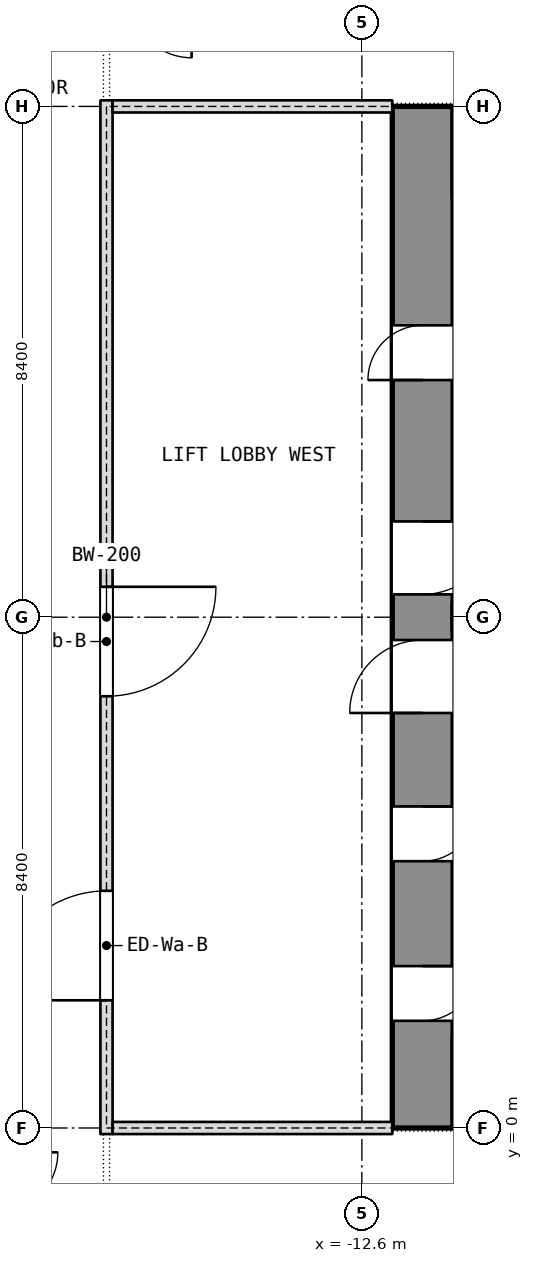
"""IFC4 building model, lengths in metres.
Left out: names, types, materials, properties, quantities, classifications, styles, units other than length and angle.
Written with IfcOpenShell. Run it as: python <this file> out.ifc"""

import sys

from ifc_helpers import new_model, si_unit, direction, frame, frame_2d, origin, place, context, subcontext, project, spatial, rectangle, extrude, element, fill, save


model = new_model("IFC4")
c1 = context("Model", 3, precision=1e-05, world=origin(), true_north=direction((0.0, 1.0)))
c2 = subcontext(c1, "Body", "Model", "MODEL_VIEW")
j1 = project(units=[si_unit("LENGTHUNIT", "METRE"), si_unit("PLANEANGLEUNIT", "RADIAN")], contexts=[c1])
p1 = place(None, origin())
s1 = spatial("IfcSite", under=j1, at=p1, CompositionType="ELEMENT")
p2 = place(p1, origin())
s2 = spatial("IfcBuilding", under=s1, at=p2, CompositionType="ELEMENT")
p3 = place(p2, frame((0.0, 0.0, 158.9)))
s3 = spatial("IfcBuildingStorey", under=s2, at=p3, CompositionType="ELEMENT", Elevation=158.9)
p4 = place(p3, frame((-11.6, 0.0, 0.0), z_axis=(0.0, 0.0, 1.0), x_axis=(0.0, 1.0, 0.0)))
e1 = element("IfcWall", 1, at=p4, inside=s3, PredefinedType="SHEAR", context=c2, shape_type="SweptSolid", body=[
    extrude(rectangle(XDim=16.8, YDim=1.0, at=frame_2d((8.4, 0.0))), origin(), (0.0, 0.0, 1.0), 3.6),
])
p5 = place(p4, frame((1.762, 0.0, 0.0)))
e2 = element("IfcOpeningElement", 2, at=p5, cuts=e1, PredefinedType="OPENING", context=c2, shape_type="SweptSolid", body=[
    extrude(rectangle(XDim=0.9, YDim=2.1, at=frame_2d((0.45, 1.05))), frame((0.0, 0.5, 0.0), z_axis=(0.0, -1.0, 0.0), x_axis=(1.0, 0.0, 0.0)), (0.0, 0.0, 1.0), 1.0),
])
p6 = place(p4, frame((4.387, 0.0, 0.0)))
e3 = element("IfcOpeningElement", 3, at=p6, cuts=e1, PredefinedType="OPENING", context=c2, shape_type="SweptSolid", body=[
    extrude(rectangle(XDim=0.9, YDim=2.1, at=frame_2d((0.45, 1.05))), frame((0.0, 0.5, 0.0), z_axis=(0.0, -1.0, 0.0), x_axis=(1.0, 0.0, 0.0)), (0.0, 0.0, 1.0), 1.0),
])
p7 = place(p4, frame((6.825, 0.0, 0.0)))
e4 = element("IfcOpeningElement", 4, at=p7, cuts=e1, PredefinedType="OPENING", context=c2, shape_type="SweptSolid", body=[
    extrude(rectangle(XDim=1.2, YDim=2.1, at=frame_2d((0.6, 1.05))), frame((0.0, 0.5, 0.0), z_axis=(0.0, -1.0, 0.0), x_axis=(1.0, 0.0, 0.0)), (0.0, 0.0, 1.0), 1.0),
])
p8 = place(p4, frame((12.3, 0.0, 0.0)))
e5 = element("IfcOpeningElement", 5, at=p8, cuts=e1, PredefinedType="OPENING", context=c2, shape_type="SweptSolid", body=[
    extrude(rectangle(XDim=0.9, YDim=2.1, at=frame_2d((0.45, 1.05))), frame((0.0, 0.5, 0.0), z_axis=(0.0, -1.0, 0.0), x_axis=(1.0, 0.0, 0.0)), (0.0, 0.0, 1.0), 1.0),
])
p9 = place(p4, frame((8.775, 0.0, 0.0)))
e6 = element("IfcOpeningElement", 6, at=p9, cuts=e1, PredefinedType="OPENING", context=c2, shape_type="SweptSolid", body=[
    extrude(rectangle(XDim=1.2, YDim=2.1, at=frame_2d((0.6, 1.05))), frame((0.0, 0.5, 0.0), z_axis=(0.0, -1.0, 0.0), x_axis=(1.0, 0.0, 0.0)), (0.0, 0.0, 1.0), 1.0),
])
p10 = place(p3, frame((-11.1, 8.4, 0.0), z_axis=(0.0, 0.0, 1.0), x_axis=(1.0, 0.0, 0.0)))
e7 = element("IfcWall", 7, at=p10, inside=s3, PredefinedType="SHEAR", context=c2, shape_type="SweptSolid", body=[
    extrude(rectangle(XDim=6.675, YDim=0.45, at=frame_2d((3.337, 0.0))), origin(), (0.0, 0.0, 1.0), 3.6),
])
p11 = place(p3, frame((-16.8, -0.1, 0.0), z_axis=(0.0, 0.0, 1.0), x_axis=(0.0, 1.0, 0.0)))
e8 = element("IfcWall", 8, at=p11, inside=s3, PredefinedType="PARTITIONING", context=c2, shape_type="SweptSolid", body=[
    extrude(rectangle(XDim=17.0, YDim=0.2, at=frame_2d((8.5, 0.0))), origin(), (0.0, 0.0, 1.0), 3.34),
])
p12 = place(p11, frame((2.2, 0.0, 0.0)))
e9 = element("IfcOpeningElement", 9, at=p12, cuts=e8, PredefinedType="OPENING", context=c2, shape_type="SweptSolid", body=[
    extrude(rectangle(XDim=1.8, YDim=2.1, at=frame_2d((0.9, 1.05))), frame((0.0, 0.1, 0.0), z_axis=(0.0, -1.0, 0.0), x_axis=(1.0, 0.0, 0.0)), (0.0, 0.0, 1.0), 0.2),
])
p13 = place(p11, frame((7.2, 0.0, 0.0)))
e10 = element("IfcOpeningElement", 10, at=p13, cuts=e8, PredefinedType="OPENING", context=c2, shape_type="SweptSolid", body=[
    extrude(rectangle(XDim=1.8, YDim=2.1, at=frame_2d((0.9, 1.05))), frame((0.0, 0.1, 0.0), z_axis=(0.0, -1.0, 0.0), x_axis=(1.0, 0.0, 0.0)), (0.0, 0.0, 1.0), 0.2),
])
for number, where, z_axis, x_axis in (
    (11, (-16.7, 0.0, 0.0), (0.0, 0.0, 1.0), (1.0, 0.0, 0.0)),
    (12, (-16.7, 16.8, 0.0), (0.0, 0.0, 1.0), (1.0, 0.0, 0.0)),
):
    element("IfcWall", number, at=place(p3, frame(where, z_axis=z_axis, x_axis=x_axis)), inside=s3, PredefinedType="PARTITIONING", context=c2, shape_type="SweptSolid", body=[
        extrude(rectangle(XDim=4.6, YDim=0.2, at=frame_2d((2.3, 0.0))), origin(), (0.0, 0.0, 1.0), 2.89),
    ])
p14 = place(p5, origin())
e13 = element("IfcDoor", 13, at=p14, inside=s3, OperationType="SINGLE_SWING_LEFT", PredefinedType="DOOR", context=c2, shape_type="SweptSolid", body=[
    extrude(rectangle(XDim=0.9, YDim=2.1, at=frame_2d((0.45, 1.05))), frame((0.0, 0.025, 0.0), z_axis=(0.0, -1.0, 0.0), x_axis=(1.0, 0.0, 0.0)), (0.0, 0.0, 1.0), 0.05),
])
fill(e2, e13)
p15 = place(p6, origin())
e14 = element("IfcDoor", 14, at=p15, inside=s3, OperationType="SINGLE_SWING_LEFT", PredefinedType="DOOR", context=c2, shape_type="SweptSolid", body=[
    extrude(rectangle(XDim=0.9, YDim=2.1, at=frame_2d((0.45, 1.05))), frame((0.0, 0.025, 0.0), z_axis=(0.0, -1.0, 0.0), x_axis=(1.0, 0.0, 0.0)), (0.0, 0.0, 1.0), 0.05),
])
fill(e3, e14)
p16 = place(p7, origin())
e15 = element("IfcDoor", 15, at=p16, inside=s3, OperationType="SINGLE_SWING_LEFT", PredefinedType="DOOR", context=c2, shape_type="SweptSolid", body=[
    extrude(rectangle(XDim=1.2, YDim=2.1, at=frame_2d((0.6, 1.05))), frame((0.0, 0.025, 0.0), z_axis=(0.0, -1.0, 0.0), x_axis=(1.0, 0.0, 0.0)), (0.0, 0.0, 1.0), 0.05),
])
fill(e4, e15)
p17 = place(p8, origin())
e16 = element("IfcDoor", 16, at=p17, inside=s3, OperationType="SINGLE_SWING_LEFT", PredefinedType="DOOR", context=c2, shape_type="SweptSolid", body=[
    extrude(rectangle(XDim=0.9, YDim=2.1, at=frame_2d((0.45, 1.05))), frame((0.0, 0.025, 0.0), z_axis=(0.0, -1.0, 0.0), x_axis=(1.0, 0.0, 0.0)), (0.0, 0.0, 1.0), 0.05),
])
fill(e5, e16)
p18 = place(p9, origin())
e17 = element("IfcDoor", 17, at=p18, inside=s3, OperationType="SINGLE_SWING_LEFT", PredefinedType="DOOR", context=c2, shape_type="SweptSolid", body=[
    extrude(rectangle(XDim=1.2, YDim=2.1, at=frame_2d((0.6, 1.05))), frame((0.0, 0.025, 0.0), z_axis=(0.0, -1.0, 0.0), x_axis=(1.0, 0.0, 0.0)), (0.0, 0.0, 1.0), 0.05),
])
fill(e6, e17)
p19 = place(p12, origin())
e18 = element("IfcDoor", 18, at=p19, inside=s3, OperationType="DOUBLE_DOOR_SINGLE_SWING", PredefinedType="DOOR", context=c2, shape_type="SweptSolid", body=[
    extrude(rectangle(XDim=1.8, YDim=2.1, at=frame_2d((0.9, 1.05))), frame((0.0, 0.025, 0.0), z_axis=(0.0, -1.0, 0.0), x_axis=(1.0, 0.0, 0.0)), (0.0, 0.0, 1.0), 0.05),
])
fill(e9, e18)
p20 = place(p13, origin())
e19 = element("IfcDoor", 19, at=p20, inside=s3, OperationType="DOUBLE_DOOR_SINGLE_SWING", PredefinedType="DOOR", context=c2, shape_type="SweptSolid", body=[
    extrude(rectangle(XDim=1.8, YDim=2.1, at=frame_2d((0.9, 1.05))), frame((0.0, 0.025, 0.0), z_axis=(0.0, -1.0, 0.0), x_axis=(1.0, 0.0, 0.0)), (0.0, 0.0, 1.0), 0.05),
])
fill(e10, e19)
save(model, sys.argv[1])
